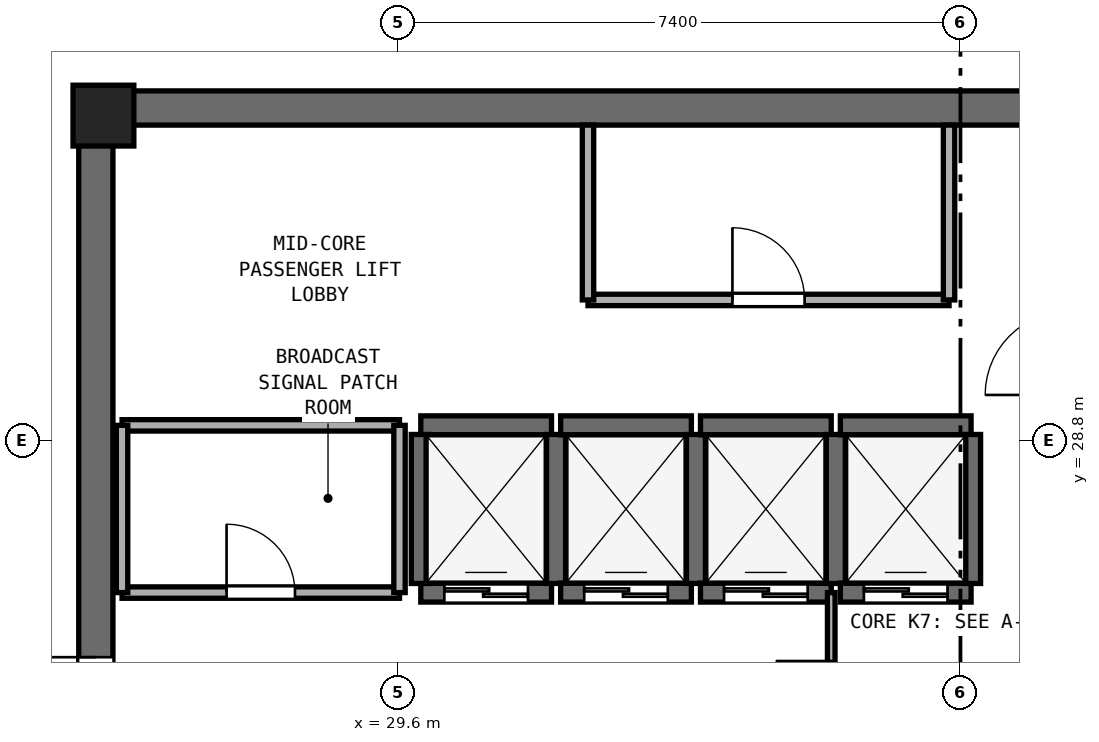
"""IFC4 building model, lengths in metres.
Left out: names, types, materials, properties, quantities, classifications, styles, units other than length and angle.
Written with IfcOpenShell. Run it as: python <this file> out.ifc"""

import sys

from ifc_helpers import new_model, si_unit, direction, frame, frame_2d, origin, origin_2d, place, context, subcontext, project, spatial, rectangle, extrude, element, fill, save


model = new_model("IFC4")
c1 = context("Model", 3, precision=1e-05, world=origin(), true_north=direction((0.0, 1.0)))
c2 = subcontext(c1, "Body", "Model", "MODEL_VIEW")
j1 = project(units=[si_unit("LENGTHUNIT", "METRE"), si_unit("PLANEANGLEUNIT", "RADIAN")], contexts=[c1])
p1 = place(None, origin())
s1 = spatial("IfcSite", under=j1, at=p1, CompositionType="ELEMENT")
p2 = place(p1, origin())
s2 = spatial("IfcBuilding", under=s1, at=p2, CompositionType="ELEMENT")
p3 = place(p2, frame((0.0, 0.0, 236.4)))
s3 = spatial("IfcBuildingStorey", under=s2, at=p3, CompositionType="ELEMENT", Elevation=236.4)
p4 = place(p3, frame((25.4, 33.175, 0.0), z_axis=(0.0, 0.0, 1.0), x_axis=(1.0, 0.0, 0.0)))
e1 = element("IfcWall", 1, at=p4, inside=s3, PredefinedType="SHEAR", context=c2, shape_type="SweptSolid", body=[
    extrude(rectangle(XDim=23.2, YDim=0.45, at=frame_2d((11.6, 0.0))), origin(), (0.0, 0.0, 1.0), 3.51),
])
p5 = place(p3, frame((25.625, 17.45, 0.0), z_axis=(0.0, 0.0, 1.0), x_axis=(0.0, 1.0, 0.0)))
e2 = element("IfcWall", 2, at=p5, inside=s3, PredefinedType="SHEAR", context=c2, shape_type="SweptSolid", body=[
    extrude(rectangle(XDim=15.5, YDim=0.45, at=frame_2d((7.75, 0.0))), origin(), (0.0, 0.0, 1.0), 3.51),
])
p6 = place(p5, frame((7.0, 0.0, 0.0)))
e3 = element("IfcOpeningElement", 3, at=p6, cuts=e2, PredefinedType="OPENING", context=c2, shape_type="SweptSolid", body=[
    extrude(rectangle(XDim=1.5, YDim=2.15, at=frame_2d((0.75, 1.075))), frame((0.0, 0.235, 0.0), z_axis=(0.0, -1.0, 0.0), x_axis=(1.0, 0.0, 0.0)), (0.0, 0.0, 1.0), 0.47),
])
p7 = place(p3, frame((25.725, 33.075, 0.0), z_axis=(0.0, 0.0, 1.0), x_axis=(1.0, 0.0, 0.0)))
e4 = element("IfcColumn", 4, at=p7, inside=s3, PredefinedType="PILASTER", context=c2, shape_type="SweptSolid", body=[
    extrude(rectangle(XDim=0.8, YDim=0.8, at=origin_2d()), origin(), (0.0, 0.0, 1.0), 3.8),
])
p8 = place(p3, frame((29.9, 26.8, 0.0), z_axis=(0.0, 0.0, 1.0), x_axis=(1.0, 0.0, 0.0)))
e5 = element("IfcWall", 5, at=p8, inside=s3, PredefinedType="SHEAR", context=c2, shape_type="SweptSolid", body=[
    extrude(rectangle(XDim=1.72, YDim=0.25, at=frame_2d((0.86, 0.0))), origin(), (0.0, 0.0, 1.0), 3.51),
])
p9 = place(p8, frame((0.31, 0.0, 0.0)))
e6 = element("IfcOpeningElement", 6, at=p9, cuts=e5, PredefinedType="OPENING", context=c2, shape_type="SweptSolid", body=[
    extrude(rectangle(XDim=1.1, YDim=2.15, at=frame_2d((0.55, 1.075))), frame((0.0, 0.135, 0.0), z_axis=(0.0, -1.0, 0.0), x_axis=(1.0, 0.0, 0.0)), (0.0, 0.0, 1.0), 0.27),
])
p10 = place(p3, frame((29.9, 29.0, 0.0), z_axis=(0.0, 0.0, 1.0), x_axis=(1.0, 0.0, 0.0)))
e7 = element("IfcWall", 7, at=p10, inside=s3, PredefinedType="SHEAR", context=c2, shape_type="SweptSolid", body=[
    extrude(rectangle(XDim=1.72, YDim=0.25, at=frame_2d((0.86, 0.0))), origin(), (0.0, 0.0, 1.0), 3.51),
])
for number, where, z_axis, x_axis in (
    (8, (29.9, 26.92, 0.0), (0.0, 0.0, 1.0), (0.0, 1.0, 0.0)),
    (9, (31.68, 26.92, 0.0), (0.0, 0.0, 1.0), (0.0, 1.0, 0.0)),
):
    element("IfcWall", number, at=place(p3, frame(where, z_axis=z_axis, x_axis=x_axis)), inside=s3, PredefinedType="SHEAR", context=c2, shape_type="SweptSolid", body=[
        extrude(rectangle(XDim=1.96, YDim=0.25, at=frame_2d((0.98, 0.0))), origin(), (0.0, 0.0, 1.0), 3.51),
    ])
p11 = place(p3, frame((31.74, 26.8, 0.0), z_axis=(0.0, 0.0, 1.0), x_axis=(1.0, 0.0, 0.0)))
e10 = element("IfcWall", 10, at=p11, inside=s3, PredefinedType="SHEAR", context=c2, shape_type="SweptSolid", body=[
    extrude(rectangle(XDim=1.72, YDim=0.25, at=frame_2d((0.86, 0.0))), origin(), (0.0, 0.0, 1.0), 3.51),
])
p12 = place(p11, frame((0.31, 0.0, 0.0)))
e11 = element("IfcOpeningElement", 11, at=p12, cuts=e10, PredefinedType="OPENING", context=c2, shape_type="SweptSolid", body=[
    extrude(rectangle(XDim=1.1, YDim=2.15, at=frame_2d((0.55, 1.075))), frame((0.0, 0.135, 0.0), z_axis=(0.0, -1.0, 0.0), x_axis=(1.0, 0.0, 0.0)), (0.0, 0.0, 1.0), 0.27),
])
p13 = place(p3, frame((31.74, 29.0, 0.0), z_axis=(0.0, 0.0, 1.0), x_axis=(1.0, 0.0, 0.0)))
e12 = element("IfcWall", 12, at=p13, inside=s3, PredefinedType="SHEAR", context=c2, shape_type="SweptSolid", body=[
    extrude(rectangle(XDim=1.72, YDim=0.25, at=frame_2d((0.86, 0.0))), origin(), (0.0, 0.0, 1.0), 3.51),
])
p14 = place(p3, frame((33.52, 26.92, 0.0), z_axis=(0.0, 0.0, 1.0), x_axis=(0.0, 1.0, 0.0)))
e13 = element("IfcWall", 13, at=p14, inside=s3, PredefinedType="SHEAR", context=c2, shape_type="SweptSolid", body=[
    extrude(rectangle(XDim=1.96, YDim=0.25, at=frame_2d((0.98, 0.0))), origin(), (0.0, 0.0, 1.0), 3.51),
])
p15 = place(p3, frame((33.58, 26.8, 0.0), z_axis=(0.0, 0.0, 1.0), x_axis=(1.0, 0.0, 0.0)))
e14 = element("IfcWall", 14, at=p15, inside=s3, PredefinedType="SHEAR", context=c2, shape_type="SweptSolid", body=[
    extrude(rectangle(XDim=1.72, YDim=0.25, at=frame_2d((0.86, 0.0))), origin(), (0.0, 0.0, 1.0), 3.51),
])
p16 = place(p15, frame((0.31, 0.0, 0.0)))
e15 = element("IfcOpeningElement", 15, at=p16, cuts=e14, PredefinedType="OPENING", context=c2, shape_type="SweptSolid", body=[
    extrude(rectangle(XDim=1.1, YDim=2.15, at=frame_2d((0.55, 1.075))), frame((0.0, 0.135, 0.0), z_axis=(0.0, -1.0, 0.0), x_axis=(1.0, 0.0, 0.0)), (0.0, 0.0, 1.0), 0.27),
])
p17 = place(p3, frame((33.58, 29.0, 0.0), z_axis=(0.0, 0.0, 1.0), x_axis=(1.0, 0.0, 0.0)))
e16 = element("IfcWall", 16, at=p17, inside=s3, PredefinedType="SHEAR", context=c2, shape_type="SweptSolid", body=[
    extrude(rectangle(XDim=1.72, YDim=0.25, at=frame_2d((0.86, 0.0))), origin(), (0.0, 0.0, 1.0), 3.51),
])
p18 = place(p3, frame((35.36, 26.92, 0.0), z_axis=(0.0, 0.0, 1.0), x_axis=(0.0, 1.0, 0.0)))
e17 = element("IfcWall", 17, at=p18, inside=s3, PredefinedType="SHEAR", context=c2, shape_type="SweptSolid", body=[
    extrude(rectangle(XDim=1.96, YDim=0.25, at=frame_2d((0.98, 0.0))), origin(), (0.0, 0.0, 1.0), 3.51),
])
p19 = place(p3, frame((35.42, 26.8, 0.0), z_axis=(0.0, 0.0, 1.0), x_axis=(1.0, 0.0, 0.0)))
e18 = element("IfcWall", 18, at=p19, inside=s3, PredefinedType="SHEAR", context=c2, shape_type="SweptSolid", body=[
    extrude(rectangle(XDim=1.72, YDim=0.25, at=frame_2d((0.86, 0.0))), origin(), (0.0, 0.0, 1.0), 3.51),
])
p20 = place(p19, frame((0.31, 0.0, 0.0)))
e19 = element("IfcOpeningElement", 19, at=p20, cuts=e18, PredefinedType="OPENING", context=c2, shape_type="SweptSolid", body=[
    extrude(rectangle(XDim=1.1, YDim=2.15, at=frame_2d((0.55, 1.075))), frame((0.0, 0.135, 0.0), z_axis=(0.0, -1.0, 0.0), x_axis=(1.0, 0.0, 0.0)), (0.0, 0.0, 1.0), 0.27),
])
p21 = place(p3, frame((35.42, 29.0, 0.0), z_axis=(0.0, 0.0, 1.0), x_axis=(1.0, 0.0, 0.0)))
e20 = element("IfcWall", 20, at=p21, inside=s3, PredefinedType="SHEAR", context=c2, shape_type="SweptSolid", body=[
    extrude(rectangle(XDim=1.72, YDim=0.25, at=frame_2d((0.86, 0.0))), origin(), (0.0, 0.0, 1.0), 3.51),
])
p22 = place(p3, frame((37.14, 26.92, 0.0), z_axis=(0.0, 0.0, 1.0), x_axis=(0.0, 1.0, 0.0)))
e21 = element("IfcWall", 21, at=p22, inside=s3, PredefinedType="SHEAR", context=c2, shape_type="SweptSolid", body=[
    extrude(rectangle(XDim=1.96, YDim=0.25, at=frame_2d((0.98, 0.0))), origin(), (0.0, 0.0, 1.0), 3.51),
])
p23 = place(p3, frame((32.1, 30.65, 0.0), z_axis=(0.0, 0.0, 1.0), x_axis=(1.0, 0.0, 0.0)))
e22 = element("IfcWall", 22, at=p23, inside=s3, PredefinedType="PARTITIONING", context=c2, shape_type="SweptSolid", body=[
    extrude(rectangle(XDim=4.75, YDim=0.15, at=frame_2d((2.375, 0.0))), origin(), (0.0, 0.0, 1.0), 3.51),
])
p24 = place(p23, frame((1.9, 0.0, 0.0)))
e23 = element("IfcOpeningElement", 23, at=p24, cuts=e22, PredefinedType="OPENING", context=c2, shape_type="SweptSolid", body=[
    extrude(rectangle(XDim=0.95, YDim=2.1, at=frame_2d((0.475, 1.05))), frame((0.0, 0.085, 0.0), z_axis=(0.0, -1.0, 0.0), x_axis=(1.0, 0.0, 0.0)), (0.0, 0.0, 1.0), 0.17),
])
for number, where, z_axis, x_axis in (
    (24, (32.1, 30.65, 0.0), (0.0, 0.0, 1.0), (0.0, 1.0, 0.0)),
    (25, (36.85, 30.65, 0.0), (0.0, 0.0, 1.0), (0.0, 1.0, 0.0)),
):
    element("IfcWall", number, at=place(p3, frame(where, z_axis=z_axis, x_axis=x_axis)), inside=s3, PredefinedType="PARTITIONING", context=c2, shape_type="SweptSolid", body=[
        extrude(rectangle(XDim=2.3, YDim=0.15, at=frame_2d((1.15, 0.0))), origin(), (0.0, 0.0, 1.0), 3.51),
    ])
p25 = place(p3, frame((25.97, 26.8, 0.0), z_axis=(0.0, 0.0, 1.0), x_axis=(1.0, 0.0, 0.0)))
e26 = element("IfcWall", 26, at=p25, inside=s3, PredefinedType="PARTITIONING", context=c2, shape_type="SweptSolid", body=[
    extrude(rectangle(XDim=3.65, YDim=0.15, at=frame_2d((1.825, 0.0))), origin(), (0.0, 0.0, 1.0), 3.51),
])
p26 = place(p25, frame((1.375, 0.0, 0.0)))
e27 = element("IfcOpeningElement", 27, at=p26, cuts=e26, PredefinedType="OPENING", context=c2, shape_type="SweptSolid", body=[
    extrude(rectangle(XDim=0.9, YDim=2.1, at=frame_2d((0.45, 1.05))), frame((0.0, 0.085, 0.0), z_axis=(0.0, -1.0, 0.0), x_axis=(1.0, 0.0, 0.0)), (0.0, 0.0, 1.0), 0.17),
])
p27 = place(p3, frame((25.97, 29.0, 0.0), z_axis=(0.0, 0.0, 1.0), x_axis=(1.0, 0.0, 0.0)))
e28 = element("IfcWall", 28, at=p27, inside=s3, PredefinedType="PARTITIONING", context=c2, shape_type="SweptSolid", body=[
    extrude(rectangle(XDim=3.65, YDim=0.15, at=frame_2d((1.825, 0.0))), origin(), (0.0, 0.0, 1.0), 3.51),
])
p28 = place(p3, frame((25.97, 26.8, 0.0), z_axis=(0.0, 0.0, 1.0), x_axis=(0.0, 1.0, 0.0)))
e29 = element("IfcWall", 29, at=p28, inside=s3, PredefinedType="PARTITIONING", context=c2, shape_type="SweptSolid", body=[
    extrude(rectangle(XDim=2.2, YDim=0.15, at=frame_2d((1.1, 0.0))), origin(), (0.0, 0.0, 1.0), 2.61),
])
p29 = place(p3, frame((29.62, 26.8, 0.0), z_axis=(0.0, 0.0, 1.0), x_axis=(0.0, 1.0, 0.0)))
e30 = element("IfcWall", 30, at=p29, inside=s3, PredefinedType="PARTITIONING", context=c2, shape_type="SweptSolid", body=[
    extrude(rectangle(XDim=2.2, YDim=0.15, at=frame_2d((1.1, 0.0))), origin(), (0.0, 0.0, 1.0), 3.51),
])
p30 = place(p3, frame((35.3, 23.6, 0.0), z_axis=(0.0, 0.0, 1.0), x_axis=(0.0, 1.0, 0.0)))
e31 = element("IfcWall", 31, at=p30, inside=s3, PredefinedType="PARTITIONING", context=c2, shape_type="SweptSolid", body=[
    extrude(rectangle(XDim=3.2, YDim=0.1, at=frame_2d((1.6, 0.0))), origin(), (0.0, 0.0, 1.0), 3.51),
])
p31 = place(p30, frame((0.85, 0.0, 0.0)))
e32 = element("IfcOpeningElement", 32, at=p31, cuts=e31, PredefinedType="OPENING", context=c2, shape_type="SweptSolid", body=[
    extrude(rectangle(XDim=1.45, YDim=2.12, at=frame_2d((0.725, 1.06))), frame((0.0, 0.06, 0.0), z_axis=(0.0, -1.0, 0.0), x_axis=(1.0, 0.0, 0.0)), (0.0, 0.0, 1.0), 0.12),
])
p32 = place(p9, origin())
e33 = element("IfcDoor", 33, at=p32, inside=s3, OperationType="DOUBLE_DOOR_SLIDING", PredefinedType="DOOR", context=c2, shape_type="SweptSolid", body=[
    extrude(rectangle(XDim=1.1, YDim=2.15, at=frame_2d((0.55, 1.075))), frame((0.0, 0.025, 0.0), z_axis=(0.0, -1.0, 0.0), x_axis=(1.0, 0.0, 0.0)), (0.0, 0.0, 1.0), 0.05),
])
fill(e6, e33)
p33 = place(p12, origin())
e34 = element("IfcDoor", 34, at=p33, inside=s3, OperationType="DOUBLE_DOOR_SLIDING", PredefinedType="DOOR", context=c2, shape_type="SweptSolid", body=[
    extrude(rectangle(XDim=1.1, YDim=2.15, at=frame_2d((0.55, 1.075))), frame((0.0, 0.025, 0.0), z_axis=(0.0, -1.0, 0.0), x_axis=(1.0, 0.0, 0.0)), (0.0, 0.0, 1.0), 0.05),
])
fill(e11, e34)
p34 = place(p16, origin())
e35 = element("IfcDoor", 35, at=p34, inside=s3, OperationType="DOUBLE_DOOR_SLIDING", PredefinedType="DOOR", context=c2, shape_type="SweptSolid", body=[
    extrude(rectangle(XDim=1.1, YDim=2.15, at=frame_2d((0.55, 1.075))), frame((0.0, 0.025, 0.0), z_axis=(0.0, -1.0, 0.0), x_axis=(1.0, 0.0, 0.0)), (0.0, 0.0, 1.0), 0.05),
])
fill(e15, e35)
p35 = place(p20, origin())
e36 = element("IfcDoor", 36, at=p35, inside=s3, OperationType="DOUBLE_DOOR_SLIDING", PredefinedType="DOOR", context=c2, shape_type="SweptSolid", body=[
    extrude(rectangle(XDim=1.1, YDim=2.15, at=frame_2d((0.55, 1.075))), frame((0.0, 0.025, 0.0), z_axis=(0.0, -1.0, 0.0), x_axis=(1.0, 0.0, 0.0)), (0.0, 0.0, 1.0), 0.05),
])
fill(e19, e36)
p36 = place(p6, origin())
e37 = element("IfcDoor", 37, at=p36, inside=s3, OperationType="DOUBLE_DOOR_SINGLE_SWING", PredefinedType="DOOR", context=c2, shape_type="SweptSolid", body=[
    extrude(rectangle(XDim=1.5, YDim=2.15, at=frame_2d((0.75, 1.075))), frame((0.0, 0.025, 0.0), z_axis=(0.0, -1.0, 0.0), x_axis=(1.0, 0.0, 0.0)), (0.0, 0.0, 1.0), 0.05),
])
fill(e3, e37)
p37 = place(p24, origin())
e38 = element("IfcDoor", 38, at=p37, inside=s3, OperationType="SINGLE_SWING_LEFT", PredefinedType="DOOR", context=c2, shape_type="SweptSolid", body=[
    extrude(rectangle(XDim=0.95, YDim=2.1, at=frame_2d((0.475, 1.05))), frame((0.0, 0.025, 0.0), z_axis=(0.0, -1.0, 0.0), x_axis=(1.0, 0.0, 0.0)), (0.0, 0.0, 1.0), 0.05),
])
fill(e23, e38)
p38 = place(p26, origin())
e39 = element("IfcDoor", 39, at=p38, inside=s3, OperationType="SINGLE_SWING_LEFT", PredefinedType="DOOR", context=c2, shape_type="SweptSolid", body=[
    extrude(rectangle(XDim=0.9, YDim=2.1, at=frame_2d((0.45, 1.05))), frame((0.0, 0.025, 0.0), z_axis=(0.0, -1.0, 0.0), x_axis=(1.0, 0.0, 0.0)), (0.0, 0.0, 1.0), 0.05),
])
fill(e27, e39)
p39 = place(p31, origin())
e40 = element("IfcDoor", 40, at=p39, inside=s3, OperationType="DOUBLE_DOOR_SINGLE_SWING", PredefinedType="DOOR", context=c2, shape_type="SweptSolid", body=[
    extrude(rectangle(XDim=1.45, YDim=2.12, at=frame_2d((0.725, 1.06))), frame((0.0, 0.025, 0.0), z_axis=(0.0, -1.0, 0.0), x_axis=(1.0, 0.0, 0.0)), (0.0, 0.0, 1.0), 0.05),
])
fill(e32, e40)
save(model, sys.argv[1])
